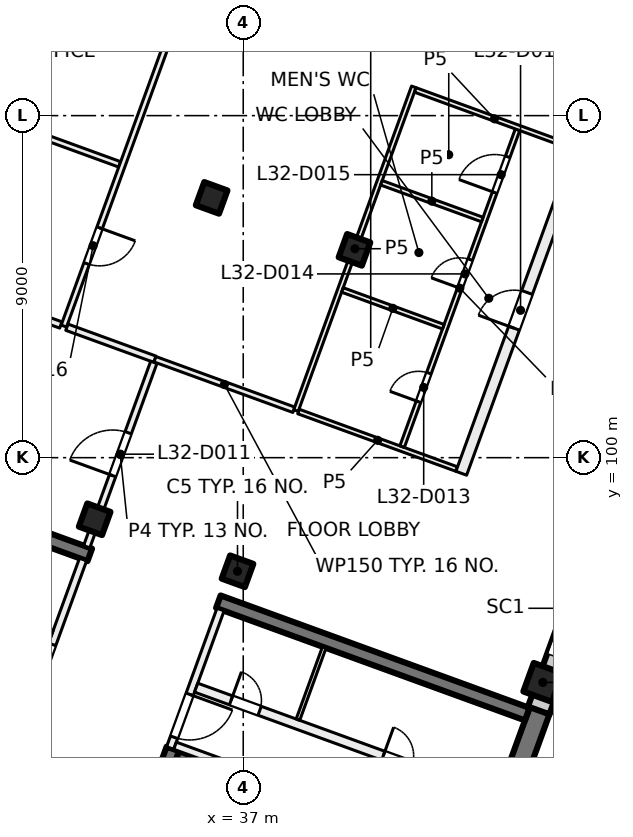
"""IFC4 building model, lengths in metres.
Left out: names, types, materials, properties, quantities, classifications, styles, units other than length and angle.
Written with IfcOpenShell. Run it as: python <this file> out.ifc"""

import sys

from ifc_helpers import new_model, si_unit, direction, frame, frame_2d, origin, origin_2d, place, context, subcontext, project, spatial, rectangle, extrude, element, fill, save


model = new_model("IFC4")
c1 = context("Model", 3, precision=1e-05, world=origin(), true_north=direction((0.0, 1.0)))
c2 = subcontext(c1, "Body", "Model", "MODEL_VIEW")
j1 = project(units=[si_unit("LENGTHUNIT", "METRE"), si_unit("PLANEANGLEUNIT", "RADIAN")], contexts=[c1])
p1 = place(None, origin())
s1 = spatial("IfcSite", under=j1, at=p1, CompositionType="ELEMENT")
p2 = place(p1, origin())
s2 = spatial("IfcBuilding", under=s1, at=p2, CompositionType="ELEMENT")
p3 = place(p2, frame((0.0, 0.0, 138.5)))
s3 = spatial("IfcBuildingStorey", under=s2, at=p3, CompositionType="ELEMENT", Elevation=138.5)
for number, where, z_axis, x_axis in (
    (1, (39.927, 105.468, 0.0), (0.0, 0.0, 1.0), (-0.342, -0.94, 0.0)),
    (2, (36.849, 97.011, 0.0), (0.0, 0.0, 1.0), (-0.342, -0.94, 0.0)),
    (3, (36.169, 106.836, 0.0), (0.0, 0.0, 1.0), (-0.342, -0.94, 0.0)),
    (4, (33.091, 98.379, 0.0), (0.0, 0.0, 1.0), (-0.342, -0.94, 0.0)),
):
    element("IfcColumn", number, at=place(p3, frame(where, z_axis=z_axis, x_axis=x_axis)), inside=s3, PredefinedType="COLUMN", context=c2, shape_type="SweptSolid", body=[
        extrude(rectangle(XDim=0.65, YDim=0.65, at=origin_2d()), origin(), (0.0, 0.0, 1.0), 4.0),
    ])
p4 = place(p3, frame((44.884, 94.087, 0.0), z_axis=(0.0, 0.0, 1.0), x_axis=(-0.342020143326, -0.939692620786, 0.0)))
e5 = element("IfcColumn", 5, at=p4, inside=s3, PredefinedType="COLUMN", context=c2, shape_type="SweptSolid", body=[
    extrude(rectangle(XDim=0.8, YDim=0.8, at=origin_2d()), origin(), (0.0, 0.0, 1.0), 4.0),
])
p5 = place(p3, frame((41.85, 85.241, 0.0), z_axis=(0.0, 0.0, 1.0), x_axis=(0.34201902012, 0.939693029598, 0.0)))
e6 = element("IfcWall", 6, at=p5, inside=s3, PredefinedType="SHEAR", context=c2, shape_type="SweptSolid", body=[
    extrude(rectangle(XDim=8.95, YDim=0.55, at=frame_2d((4.475, 0.0))), origin(), (0.0, 0.0, 1.0), 4.0),
])
p6 = place(p3, frame((30.967, 80.848, 0.0), z_axis=(0.0, 0.0, 1.0), x_axis=(0.34201563943, 0.939694260058, 0.0)))
e7 = element("IfcWall", 7, at=p6, inside=s3, PredefinedType="SHEAR", context=c2, shape_type="SweptSolid", body=[
    extrude(rectangle(XDim=12.225, YDim=0.35, at=frame_2d((6.113, 0.0))), origin(), (0.0, 0.0, 1.0), 4.0),
])
p7 = place(p6, frame((0.85, 0.0, 0.0)))
e8 = element("IfcOpeningElement", 8, at=p7, cuts=e7, PredefinedType="OPENING", context=c2, shape_type="SweptSolid", body=[
    extrude(rectangle(XDim=0.8, YDim=2.1, at=frame_2d((0.4, 1.05))), frame((0.0, 0.185, 0.0), z_axis=(0.0, -1.0, 0.0), x_axis=(1.0, 0.0, 0.0)), (0.0, 0.0, 1.0), 0.37),
])
p8 = place(p6, frame((5.65, 0.0, 0.0)))
e9 = element("IfcOpeningElement", 9, at=p8, cuts=e7, PredefinedType="OPENING", context=c2, shape_type="SweptSolid", body=[
    extrude(rectangle(XDim=0.8, YDim=2.1, at=frame_2d((0.4, 1.05))), frame((0.0, 0.185, 0.0), z_axis=(0.0, -1.0, 0.0), x_axis=(1.0, 0.0, 0.0)), (0.0, 0.0, 1.0), 0.37),
])
p9 = place(p3, frame((38.118, 91.068, 0.0), z_axis=(0.0, 0.0, 1.0), x_axis=(-0.939692892192, 0.342019397644, 0.0)))
e10 = element("IfcWall", 10, at=p9, inside=s3, PredefinedType="SHEAR", context=c2, shape_type="SweptSolid", body=[
    extrude(rectangle(XDim=3.05, YDim=0.35, at=frame_2d((1.525, 0.0))), origin(), (0.0, 0.0, 1.0), 4.0),
])
p10 = place(p3, frame((44.473, 93.251, 0.0), z_axis=(0.0, 0.0, 1.0), x_axis=(-0.939692847377, 0.34201952077, 0.0)))
e11 = element("IfcWall", 11, at=p10, inside=s3, PredefinedType="SHEAR", context=c2, shape_type="SweptSolid", body=[
    extrude(rectangle(XDim=8.65, YDim=0.35, at=frame_2d((4.325, 0.0))), origin(), (0.0, 0.0, 1.0), 4.0),
])
p11 = place(p3, frame((32.962, 97.441, 0.0), z_axis=(0.0, 0.0, 1.0), x_axis=(-0.939689545667, 0.342028592028, 0.0)))
e12 = element("IfcWall", 12, at=p11, inside=s3, PredefinedType="SHEAR", context=c2, shape_type="SweptSolid", body=[
    extrude(rectangle(XDim=8.65, YDim=0.35, at=frame_2d((4.325, 0.0))), origin(), (0.0, 0.0, 1.0), 4.0),
])
p12 = place(p3, frame((52.212, 113.783, 0.0), z_axis=(0.0, 0.0, 1.0), x_axis=(-0.34202521188, -0.939690775968, 0.0)))
e13 = element("IfcWall", 13, at=p12, inside=s3, PredefinedType="SOLIDWALL", context=c2, shape_type="SweptSolid", body=[
    extrude(rectangle(XDim=21.745, YDim=0.6, at=frame_2d((10.873, 0.0))), origin(), (0.0, 0.0, 1.0), 3.625),
])
p13 = place(p12, frame((3.765, 0.0, 0.9)))
e14 = element("IfcOpeningElement", 14, at=p13, cuts=e13, PredefinedType="OPENING", context=c2, shape_type="SweptSolid", body=[
    extrude(rectangle(XDim=3.0, YDim=2.4, at=frame_2d((1.5, 1.2))), frame((0.0, 0.31, 0.0), z_axis=(0.0, -1.0, 0.0), x_axis=(1.0, 0.0, 0.0)), (0.0, 0.0, 1.0), 0.62),
])
p14 = place(p12, frame((8.265, 0.0, 0.9)))
e15 = element("IfcOpeningElement", 15, at=p14, cuts=e13, PredefinedType="OPENING", context=c2, shape_type="SweptSolid", body=[
    extrude(rectangle(XDim=3.0, YDim=2.4, at=frame_2d((1.5, 1.2))), frame((0.0, 0.31, 0.0), z_axis=(0.0, -1.0, 0.0), x_axis=(1.0, 0.0, 0.0)), (0.0, 0.0, 1.0), 0.62),
])
p15 = place(p12, frame((12.765, 0.0, 0.9)))
e16 = element("IfcOpeningElement", 16, at=p15, cuts=e13, PredefinedType="OPENING", context=c2, shape_type="SweptSolid", body=[
    extrude(rectangle(XDim=3.0, YDim=2.4, at=frame_2d((1.5, 1.2))), frame((0.0, 0.31, 0.0), z_axis=(0.0, -1.0, 0.0), x_axis=(1.0, 0.0, 0.0)), (0.0, 0.0, 1.0), 0.62),
])
p16 = place(p12, frame((17.265, 0.0, 0.9)))
e17 = element("IfcOpeningElement", 17, at=p16, cuts=e13, PredefinedType="OPENING", context=c2, shape_type="SweptSolid", body=[
    extrude(rectangle(XDim=3.0, YDim=2.4, at=frame_2d((1.5, 1.2))), frame((0.0, 0.31, 0.0), z_axis=(0.0, -1.0, 0.0), x_axis=(1.0, 0.0, 0.0)), (0.0, 0.0, 1.0), 0.62),
])
p17 = place(p3, frame((24.666, 100.669, 0.0), z_axis=(0.0, 0.0, 1.0), x_axis=(0.34201964167, 0.939692803373, 0.0)))
e18 = element("IfcWall", 18, at=p17, inside=s3, PredefinedType="SOLIDWALL", context=c2, shape_type="SweptSolid", body=[
    extrude(rectangle(XDim=32.884, YDim=0.6, at=frame_2d((16.442, 0.0))), origin(), (0.0, 0.0, 1.0), 3.625),
])
p18 = place(p17, frame((1.48, 0.0, 0.9)))
e19 = element("IfcOpeningElement", 19, at=p18, cuts=e18, PredefinedType="OPENING", context=c2, shape_type="SweptSolid", body=[
    extrude(rectangle(XDim=3.0, YDim=2.4, at=frame_2d((1.5, 1.2))), frame((0.0, 0.31, 0.0), z_axis=(0.0, -1.0, 0.0), x_axis=(1.0, 0.0, 0.0)), (0.0, 0.0, 1.0), 0.62),
])
p19 = place(p17, frame((5.98, 0.0, 0.9)))
e20 = element("IfcOpeningElement", 20, at=p19, cuts=e18, PredefinedType="OPENING", context=c2, shape_type="SweptSolid", body=[
    extrude(rectangle(XDim=3.0, YDim=2.4, at=frame_2d((1.5, 1.2))), frame((0.0, 0.31, 0.0), z_axis=(0.0, -1.0, 0.0), x_axis=(1.0, 0.0, 0.0)), (0.0, 0.0, 1.0), 0.62),
])
p20 = place(p17, frame((10.48, 0.0, 0.9)))
e21 = element("IfcOpeningElement", 21, at=p20, cuts=e18, PredefinedType="OPENING", context=c2, shape_type="SweptSolid", body=[
    extrude(rectangle(XDim=3.0, YDim=2.4, at=frame_2d((1.5, 1.2))), frame((0.0, 0.31, 0.0), z_axis=(0.0, -1.0, 0.0), x_axis=(1.0, 0.0, 0.0)), (0.0, 0.0, 1.0), 0.62),
])
p21 = place(p17, frame((14.98, 0.0, 0.9)))
e22 = element("IfcOpeningElement", 22, at=p21, cuts=e18, PredefinedType="OPENING", context=c2, shape_type="SweptSolid", body=[
    extrude(rectangle(XDim=3.0, YDim=2.4, at=frame_2d((1.5, 1.2))), frame((0.0, 0.31, 0.0), z_axis=(0.0, -1.0, 0.0), x_axis=(1.0, 0.0, 0.0)), (0.0, 0.0, 1.0), 0.62),
])
p22 = place(p17, frame((19.48, 0.0, 0.9)))
e23 = element("IfcOpeningElement", 23, at=p22, cuts=e18, PredefinedType="OPENING", context=c2, shape_type="SweptSolid", body=[
    extrude(rectangle(XDim=3.0, YDim=2.4, at=frame_2d((1.5, 1.2))), frame((0.0, 0.31, 0.0), z_axis=(0.0, -1.0, 0.0), x_axis=(1.0, 0.0, 0.0)), (0.0, 0.0, 1.0), 0.62),
])
p23 = place(p17, frame((23.98, 0.0, 0.9)))
e24 = element("IfcOpeningElement", 24, at=p23, cuts=e18, PredefinedType="OPENING", context=c2, shape_type="SweptSolid", body=[
    extrude(rectangle(XDim=3.0, YDim=2.4, at=frame_2d((1.5, 1.2))), frame((0.0, 0.31, 0.0), z_axis=(0.0, -1.0, 0.0), x_axis=(1.0, 0.0, 0.0)), (0.0, 0.0, 1.0), 0.62),
])
p24 = place(p17, frame((28.48, 0.0, 0.9)))
e25 = element("IfcOpeningElement", 25, at=p24, cuts=e18, PredefinedType="OPENING", context=c2, shape_type="SweptSolid", body=[
    extrude(rectangle(XDim=3.0, YDim=2.4, at=frame_2d((1.5, 1.2))), frame((0.0, 0.31, 0.0), z_axis=(0.0, -1.0, 0.0), x_axis=(1.0, 0.0, 0.0)), (0.0, 0.0, 1.0), 0.62),
])
p25 = place(p3, frame((31.459, 93.678, 0.0), z_axis=(0.0, 0.0, 1.0), x_axis=(0.341985870128, 0.939705094502, 0.0)))
e26 = element("IfcWall", 26, at=p25, inside=s3, PredefinedType="PARTITIONING", context=c2, shape_type="SweptSolid", body=[
    extrude(rectangle(XDim=3.875, YDim=0.2, at=frame_2d((1.938, 0.0))), origin(), (0.0, 0.0, 1.0), 3.625),
])
p26 = place(p25, frame((0.3, 0.0, 0.0)))
e27 = element("IfcOpeningElement", 27, at=p26, cuts=e26, PredefinedType="OPENING", context=c2, shape_type="SweptSolid", body=[
    extrude(rectangle(XDim=1.2, YDim=2.1, at=frame_2d((0.6, 1.05))), frame((0.0, 0.11, 0.0), z_axis=(0.0, -1.0, 0.0), x_axis=(1.0, 0.0, 0.0)), (0.0, 0.0, 1.0), 0.22),
])
p27 = place(p3, frame((24.039, 98.215, 0.0), z_axis=(0.0, 0.0, 1.0), x_axis=(0.939687617333, -0.342033889887, 0.0)))
e28 = element("IfcWall", 28, at=p27, inside=s3, PredefinedType="PARTITIONING", context=c2, shape_type="SweptSolid", body=[
    extrude(rectangle(XDim=8.425, YDim=0.25, at=frame_2d((4.212, 0.0))), origin(), (0.0, 0.0, 1.0), 3.625),
])
p28 = place(p27, frame((3.812, 0.0, 0.0)))
e29 = element("IfcOpeningElement", 29, at=p28, cuts=e28, PredefinedType="OPENING", context=c2, shape_type="SweptSolid", body=[
    extrude(rectangle(XDim=0.8, YDim=2.1, at=frame_2d((0.4, 1.05))), frame((0.0, 0.135, 0.0), z_axis=(0.0, -1.0, 0.0), x_axis=(1.0, 0.0, 0.0)), (0.0, 0.0, 1.0), 0.27),
])
p29 = place(p3, frame((36.403, 96.003, 0.0), z_axis=(0.0, 0.0, 1.0), x_axis=(-0.342041503764, -0.939684845947, 0.0)))
e30 = element("IfcWall", 30, at=p29, inside=s3, PredefinedType="PARTITIONING", context=c2, shape_type="SweptSolid", body=[
    extrude(rectangle(XDim=3.875, YDim=0.2, at=frame_2d((1.938, 0.0))), origin(), (0.0, 0.0, 1.0), 3.625),
])
p30 = place(p29, frame((2.375, 0.0, 0.0)))
e31 = element("IfcOpeningElement", 31, at=p30, cuts=e30, PredefinedType="OPENING", context=c2, shape_type="SweptSolid", body=[
    extrude(rectangle(XDim=1.2, YDim=2.1, at=frame_2d((0.6, 1.05))), frame((0.0, 0.11, 0.0), z_axis=(0.0, -1.0, 0.0), x_axis=(1.0, 0.0, 0.0)), (0.0, 0.0, 1.0), 0.22),
])
p31 = place(p3, frame((35.205, 92.421, 0.0), z_axis=(0.0, 0.0, 1.0), x_axis=(0.939691007314, -0.342024576271, 0.0)))
e32 = element("IfcWall", 32, at=p31, inside=s3, PredefinedType="PARTITIONING", context=c2, shape_type="SweptSolid", body=[
    extrude(rectangle(XDim=8.425, YDim=0.2, at=frame_2d((4.212, 0.0))), origin(), (0.0, 0.0, 1.0), 3.625),
])
p32 = place(p31, frame((5.238, 0.0, 0.0)))
e33 = element("IfcOpeningElement", 33, at=p32, cuts=e32, PredefinedType="OPENING", context=c2, shape_type="SweptSolid", body=[
    extrude(rectangle(XDim=1.5, YDim=2.1, at=frame_2d((0.75, 1.05))), frame((0.0, 0.11, 0.0), z_axis=(0.0, -1.0, 0.0), x_axis=(1.0, 0.0, 0.0)), (0.0, 0.0, 1.0), 0.22),
])
p33 = place(p3, frame((35.761, 93.948, 0.0), z_axis=(0.0, 0.0, 1.0), x_axis=(0.93969693093, -0.342008301071, 0.0)))
e34 = element("IfcWall", 34, at=p33, inside=s3, PredefinedType="PARTITIONING", context=c2, shape_type="SweptSolid", body=[
    extrude(rectangle(XDim=8.425, YDim=0.25, at=frame_2d((4.212, 0.0))), origin(), (0.0, 0.0, 1.0), 3.625),
])
p34 = place(p33, frame((0.978, 0.0, 0.0)))
e35 = element("IfcOpeningElement", 35, at=p34, cuts=e34, PredefinedType="OPENING", context=c2, shape_type="SweptSolid", body=[
    extrude(rectangle(XDim=0.8, YDim=2.1, at=frame_2d((0.4, 1.05))), frame((0.0, 0.135, 0.0), z_axis=(0.0, -1.0, 0.0), x_axis=(1.0, 0.0, 0.0)), (0.0, 0.0, 1.0), 0.27),
])
p35 = place(p33, frame((5.24, 0.0, 0.0)))
e36 = element("IfcOpeningElement", 36, at=p35, cuts=e34, PredefinedType="OPENING", context=c2, shape_type="SweptSolid", body=[
    extrude(rectangle(XDim=0.8, YDim=2.1, at=frame_2d((0.4, 1.05))), frame((0.0, 0.135, 0.0), z_axis=(0.0, -1.0, 0.0), x_axis=(1.0, 0.0, 0.0)), (0.0, 0.0, 1.0), 0.27),
])
p36 = place(p3, frame((39.132, 95.009, 0.0), z_axis=(0.0, 0.0, 1.0), x_axis=(-0.342043138314, -0.939684250976, 0.0)))
e37 = element("IfcWall", 37, at=p36, inside=s3, PredefinedType="PARTITIONING", context=c2, shape_type="SweptSolid", body=[
    extrude(rectangle(XDim=2.025, YDim=0.1, at=frame_2d((1.012, 0.0))), origin(), (0.0, 0.0, 1.0), 3.625),
])
p37 = place(p3, frame((26.736, 105.48, 0.0), z_axis=(0.0, 0.0, 1.0), x_axis=(0.939674453825, -0.342070052516, 0.0)))
e38 = element("IfcWall", 38, at=p37, inside=s3, PredefinedType="PARTITIONING", context=c2, shape_type="SweptSolid", body=[
    extrude(rectangle(XDim=5.815, YDim=0.175, at=frame_2d((2.907, 0.0))), origin(), (0.0, 0.0, 1.0), 3.625),
])
p38 = place(p3, frame((28.275, 109.709, 0.0), z_axis=(0.0, 0.0, 1.0), x_axis=(0.939718757431, -0.341948324943, 0.0)))
e39 = element("IfcWall", 39, at=p38, inside=s3, PredefinedType="PARTITIONING", context=c2, shape_type="SweptSolid", body=[
    extrude(rectangle(XDim=5.825, YDim=0.15, at=frame_2d((2.913, 0.0))), origin(), (0.0, 0.0, 1.0), 3.625),
])
p39 = place(p3, frame((32.359, 103.433, 0.0), z_axis=(0.0, 0.0, 1.0), x_axis=(0.939784753685, -0.341766904105, 0.0)))
e40 = element("IfcWall", 40, at=p39, inside=s3, PredefinedType="PARTITIONING", context=c2, shape_type="SweptSolid", body=[
    extrude(rectangle(XDim=2.467, YDim=0.175, at=frame_2d((1.233, 0.0))), origin(), (0.0, 0.0, 1.0), 3.625),
])
p40 = place(p3, frame((32.881, 97.657, 0.0), z_axis=(0.0, 0.0, 1.0), x_axis=(0.342058204353, 0.939678766832, 0.0)))
e41 = element("IfcWall", 41, at=p40, inside=s3, PredefinedType="PARTITIONING", context=c2, shape_type="SweptSolid", body=[
    extrude(rectangle(XDim=5.163, YDim=0.175, at=frame_2d((2.581, 0.0))), origin(), (0.0, 0.0, 1.0), 3.625),
])
p41 = place(p40, frame((1.991, 0.0, 0.0)))
e42 = element("IfcOpeningElement", 42, at=p41, cuts=e41, PredefinedType="OPENING", context=c2, shape_type="SweptSolid", body=[
    extrude(rectangle(XDim=1.2, YDim=2.1, at=frame_2d((0.6, 1.05))), frame((0.0, 0.097, 0.0), z_axis=(0.0, -1.0, 0.0), x_axis=(1.0, 0.0, 0.0)), (0.0, 0.0, 1.0), 0.195),
])
p42 = place(p3, frame((34.677, 102.59, 0.0), z_axis=(0.0, 0.0, 1.0), x_axis=(0.939712759945, -0.341964806371, 0.0)))
e43 = element("IfcWall", 43, at=p42, inside=s3, PredefinedType="PARTITIONING", context=c2, shape_type="SweptSolid", body=[
    extrude(rectangle(XDim=3.889, YDim=0.15, at=frame_2d((1.945, 0.0))), origin(), (0.0, 0.0, 1.0), 3.625),
])
p43 = place(p3, frame((35.385, 111.99, 0.0), z_axis=(0.0, 0.0, 1.0), x_axis=(-0.342153449842, -0.939644090473, 0.0)))
e44 = element("IfcWall", 44, at=p43, inside=s3, PredefinedType="PARTITIONING", context=c2, shape_type="SweptSolid", body=[
    extrude(rectangle(XDim=9.075, YDim=0.15, at=frame_2d((4.537, 0.0))), origin(), (0.0, 0.0, 1.0), 3.625),
])
p44 = place(p43, frame((6.325, 0.0, 0.0)))
e45 = element("IfcOpeningElement", 45, at=p44, cuts=e44, PredefinedType="OPENING", context=c2, shape_type="SweptSolid", body=[
    extrude(rectangle(XDim=1.0, YDim=2.1, at=frame_2d((0.5, 1.05))), frame((0.0, 0.085, 0.0), z_axis=(0.0, -1.0, 0.0), x_axis=(1.0, 0.0, 0.0)), (0.0, 0.0, 1.0), 0.17),
])
p45 = place(p3, frame((38.455, 101.214, 0.0), z_axis=(0.0, 0.0, 1.0), x_axis=(0.939738687483, -0.341893549585, 0.0)))
e46 = element("IfcWall", 46, at=p45, inside=s3, PredefinedType="PARTITIONING", context=c2, shape_type="SweptSolid", body=[
    extrude(rectangle(XDim=4.429, YDim=0.125, at=frame_2d((2.214, 0.0))), origin(), (0.0, 0.0, 1.0), 3.625),
])
p46 = place(p3, frame((38.388, 101.24, 0.0), z_axis=(0.0, 0.0, 1.0), x_axis=(0.342067486799, 0.93967538782, 0.0)))
e47 = element("IfcWall", 47, at=p46, inside=s3, PredefinedType="PARTITIONING", context=c2, shape_type="SweptSolid", body=[
    extrude(rectangle(XDim=9.063, YDim=0.125, at=frame_2d((4.531, 0.0))), origin(), (0.0, 0.0, 1.0), 3.625),
])
p47 = place(p3, frame((41.181, 100.29, 0.0), z_axis=(0.0, 0.0, 1.0), x_axis=(0.34222012082, 0.939619810831, 0.0)))
e48 = element("IfcWall", 48, at=p47, inside=s3, PredefinedType="PARTITIONING", context=c2, shape_type="SweptSolid", body=[
    extrude(rectangle(XDim=8.875, YDim=0.125, at=frame_2d((4.438, 0.0))), origin(), (0.0, 0.0, 1.0), 3.625),
])
p48 = place(p47, frame((1.258, 0.0, 0.0)))
e49 = element("IfcOpeningElement", 49, at=p48, cuts=e48, PredefinedType="OPENING", context=c2, shape_type="SweptSolid", body=[
    extrude(rectangle(XDim=0.8, YDim=2.1, at=frame_2d((0.4, 1.05))), frame((0.0, 0.073, 0.0), z_axis=(0.0, -1.0, 0.0), x_axis=(1.0, 0.0, 0.0)), (0.0, 0.0, 1.0), 0.145),
])
p49 = place(p47, frame((4.437, 0.0, 0.0)))
e50 = element("IfcOpeningElement", 50, at=p49, cuts=e48, PredefinedType="OPENING", context=c2, shape_type="SweptSolid", body=[
    extrude(rectangle(XDim=0.8, YDim=2.1, at=frame_2d((0.4, 1.05))), frame((0.0, 0.073, 0.0), z_axis=(0.0, -1.0, 0.0), x_axis=(1.0, 0.0, 0.0)), (0.0, 0.0, 1.0), 0.145),
])
p50 = place(p47, frame((7.116, 0.0, 0.0)))
e51 = element("IfcOpeningElement", 51, at=p50, cuts=e48, PredefinedType="OPENING", context=c2, shape_type="SweptSolid", body=[
    extrude(rectangle(XDim=1.0, YDim=2.1, at=frame_2d((0.5, 1.05))), frame((0.0, 0.073, 0.0), z_axis=(0.0, -1.0, 0.0), x_axis=(1.0, 0.0, 0.0)), (0.0, 0.0, 1.0), 0.145),
])
p51 = place(p3, frame((41.526, 109.676, 0.0), z_axis=(0.0, 0.0, 1.0), x_axis=(0.939577975992, -0.342334963203, 0.0)))
e52 = element("IfcWall", 52, at=p51, inside=s3, PredefinedType="PARTITIONING", context=c2, shape_type="SweptSolid", body=[
    extrude(rectangle(XDim=4.437, YDim=0.125, at=frame_2d((2.219, 0.0))), origin(), (0.0, 0.0, 1.0), 3.625),
])
p52 = place(p3, frame((42.264, 103.446, 0.0), z_axis=(0.0, 0.0, 1.0), x_axis=(-0.939563555473, 0.342374539396, 0.0)))
e53 = element("IfcWall", 53, at=p52, inside=s3, PredefinedType="PARTITIONING", context=c2, shape_type="SweptSolid", body=[
    extrude(rectangle(XDim=2.824, YDim=0.125, at=frame_2d((1.412, 0.0))), origin(), (0.0, 0.0, 1.0), 3.625),
])
p53 = place(p3, frame((42.737, 99.59, 0.0), z_axis=(0.0, 0.0, 1.0), x_axis=(0.341992703977, 0.939702607438, 0.0)))
e54 = element("IfcWall", 54, at=p53, inside=s3, PredefinedType="PARTITIONING", context=c2, shape_type="SweptSolid", body=[
    extrude(rectangle(XDim=23.006, YDim=0.3, at=frame_2d((11.503, 0.0))), origin(), (0.0, 0.0, 1.0), 3.625),
])
p54 = place(p53, frame((4.062, 0.0, 0.0)))
e55 = element("IfcOpeningElement", 55, at=p54, cuts=e54, PredefinedType="OPENING", context=c2, shape_type="SweptSolid", body=[
    extrude(rectangle(XDim=1.0, YDim=2.1, at=frame_2d((0.5, 1.05))), frame((0.0, 0.16, 0.0), z_axis=(0.0, -1.0, 0.0), x_axis=(1.0, 0.0, 0.0)), (0.0, 0.0, 1.0), 0.32),
])
p55 = place(p53, frame((14.912, 0.0, 0.0)))
e56 = element("IfcOpeningElement", 56, at=p55, cuts=e54, PredefinedType="OPENING", context=c2, shape_type="SweptSolid", body=[
    extrude(rectangle(XDim=1.8, YDim=2.1, at=frame_2d((0.9, 1.05))), frame((0.0, 0.16, 0.0), z_axis=(0.0, -1.0, 0.0), x_axis=(1.0, 0.0, 0.0)), (0.0, 0.0, 1.0), 0.32),
])
p56 = place(p3, frame((43.29, 106.266, 0.0), z_axis=(0.0, 0.0, 1.0), x_axis=(-0.939601484935, 0.342270433294, 0.0)))
e57 = element("IfcWall", 57, at=p56, inside=s3, PredefinedType="PARTITIONING", context=c2, shape_type="SweptSolid", body=[
    extrude(rectangle(XDim=2.825, YDim=0.125, at=frame_2d((1.412, 0.0))), origin(), (0.0, 0.0, 1.0), 3.625),
])
p57 = place(p26, origin())
e58 = element("IfcDoor", 58, at=p57, inside=s3, OperationType="DOUBLE_DOOR_SINGLE_SWING", PredefinedType="DOOR", context=c2, shape_type="SweptSolid", body=[
    extrude(rectangle(XDim=1.2, YDim=2.1, at=frame_2d((0.6, 1.05))), frame((0.0, 0.025, 0.0), z_axis=(0.0, -1.0, 0.0), x_axis=(1.0, 0.0, 0.0)), (0.0, 0.0, 1.0), 0.05),
])
fill(e27, e58)
p58 = place(p30, origin())
e59 = element("IfcDoor", 59, at=p58, inside=s3, OperationType="DOUBLE_DOOR_SINGLE_SWING", PredefinedType="DOOR", context=c2, shape_type="SweptSolid", body=[
    extrude(rectangle(XDim=1.2, YDim=2.1, at=frame_2d((0.6, 1.05))), frame((0.0, 0.025, 0.0), z_axis=(0.0, -1.0, 0.0), x_axis=(1.0, 0.0, 0.0)), (0.0, 0.0, 1.0), 0.05),
])
fill(e31, e59)
p59 = place(p34, origin())
e60 = element("IfcDoor", 60, at=p59, inside=s3, OperationType="SINGLE_SWING_RIGHT", PredefinedType="DOOR", context=c2, shape_type="SweptSolid", body=[
    extrude(rectangle(XDim=0.8, YDim=2.1, at=frame_2d((0.4, 1.05))), frame((0.0, 0.025, 0.0), z_axis=(0.0, -1.0, 0.0), x_axis=(1.0, 0.0, 0.0)), (0.0, 0.0, 1.0), 0.05),
])
fill(e35, e60)
p60 = place(p35, origin())
e61 = element("IfcDoor", 61, at=p60, inside=s3, OperationType="SINGLE_SWING_LEFT", PredefinedType="DOOR", context=c2, shape_type="SweptSolid", body=[
    extrude(rectangle(XDim=0.8, YDim=2.1, at=frame_2d((0.4, 1.05))), frame((0.0, 0.025, 0.0), z_axis=(0.0, -1.0, 0.0), x_axis=(1.0, 0.0, 0.0)), (0.0, 0.0, 1.0), 0.05),
])
fill(e36, e61)
p61 = place(p41, origin())
e62 = element("IfcDoor", 62, at=p61, inside=s3, OperationType="DOUBLE_DOOR_SINGLE_SWING", PredefinedType="DOOR", context=c2, shape_type="SweptSolid", body=[
    extrude(rectangle(XDim=1.2, YDim=2.1, at=frame_2d((0.6, 1.05))), frame((0.0, 0.025, 0.0), z_axis=(0.0, -1.0, 0.0), x_axis=(1.0, 0.0, 0.0)), (0.0, 0.0, 1.0), 0.05),
])
fill(e42, e62)
p62 = place(p54, origin())
e63 = element("IfcDoor", 63, at=p62, inside=s3, OperationType="SINGLE_SWING_LEFT", PredefinedType="DOOR", context=c2, shape_type="SweptSolid", body=[
    extrude(rectangle(XDim=1.0, YDim=2.1, at=frame_2d((0.5, 1.05))), frame((0.0, 0.025, 0.0), z_axis=(0.0, -1.0, 0.0), x_axis=(1.0, 0.0, 0.0)), (0.0, 0.0, 1.0), 0.05),
])
fill(e55, e63)
p63 = place(p48, origin())
e64 = element("IfcDoor", 64, at=p63, inside=s3, OperationType="SINGLE_SWING_LEFT", PredefinedType="DOOR", context=c2, shape_type="SweptSolid", body=[
    extrude(rectangle(XDim=0.8, YDim=2.1, at=frame_2d((0.4, 1.05))), frame((0.0, 0.025, 0.0), z_axis=(0.0, -1.0, 0.0), x_axis=(1.0, 0.0, 0.0)), (0.0, 0.0, 1.0), 0.05),
])
fill(e49, e64)
p64 = place(p49, origin())
e65 = element("IfcDoor", 65, at=p64, inside=s3, OperationType="SINGLE_SWING_LEFT", PredefinedType="DOOR", context=c2, shape_type="SweptSolid", body=[
    extrude(rectangle(XDim=0.8, YDim=2.1, at=frame_2d((0.4, 1.05))), frame((0.0, 0.025, 0.0), z_axis=(0.0, -1.0, 0.0), x_axis=(1.0, 0.0, 0.0)), (0.0, 0.0, 1.0), 0.05),
])
fill(e50, e65)
p65 = place(p50, origin())
e66 = element("IfcDoor", 66, at=p65, inside=s3, OperationType="SINGLE_SWING_LEFT", PredefinedType="DOOR", context=c2, shape_type="SweptSolid", body=[
    extrude(rectangle(XDim=1.0, YDim=2.1, at=frame_2d((0.5, 1.05))), frame((0.0, 0.025, 0.0), z_axis=(0.0, -1.0, 0.0), x_axis=(1.0, 0.0, 0.0)), (0.0, 0.0, 1.0), 0.05),
])
fill(e51, e66)
p66 = place(p44, origin())
e67 = element("IfcDoor", 67, at=p66, inside=s3, OperationType="SINGLE_SWING_LEFT", PredefinedType="DOOR", context=c2, shape_type="SweptSolid", body=[
    extrude(rectangle(XDim=1.0, YDim=2.1, at=frame_2d((0.5, 1.05))), frame((0.0, 0.025, 0.0), z_axis=(0.0, -1.0, 0.0), x_axis=(1.0, 0.0, 0.0)), (0.0, 0.0, 1.0), 0.05),
])
fill(e45, e67)
save(model, sys.argv[1])
